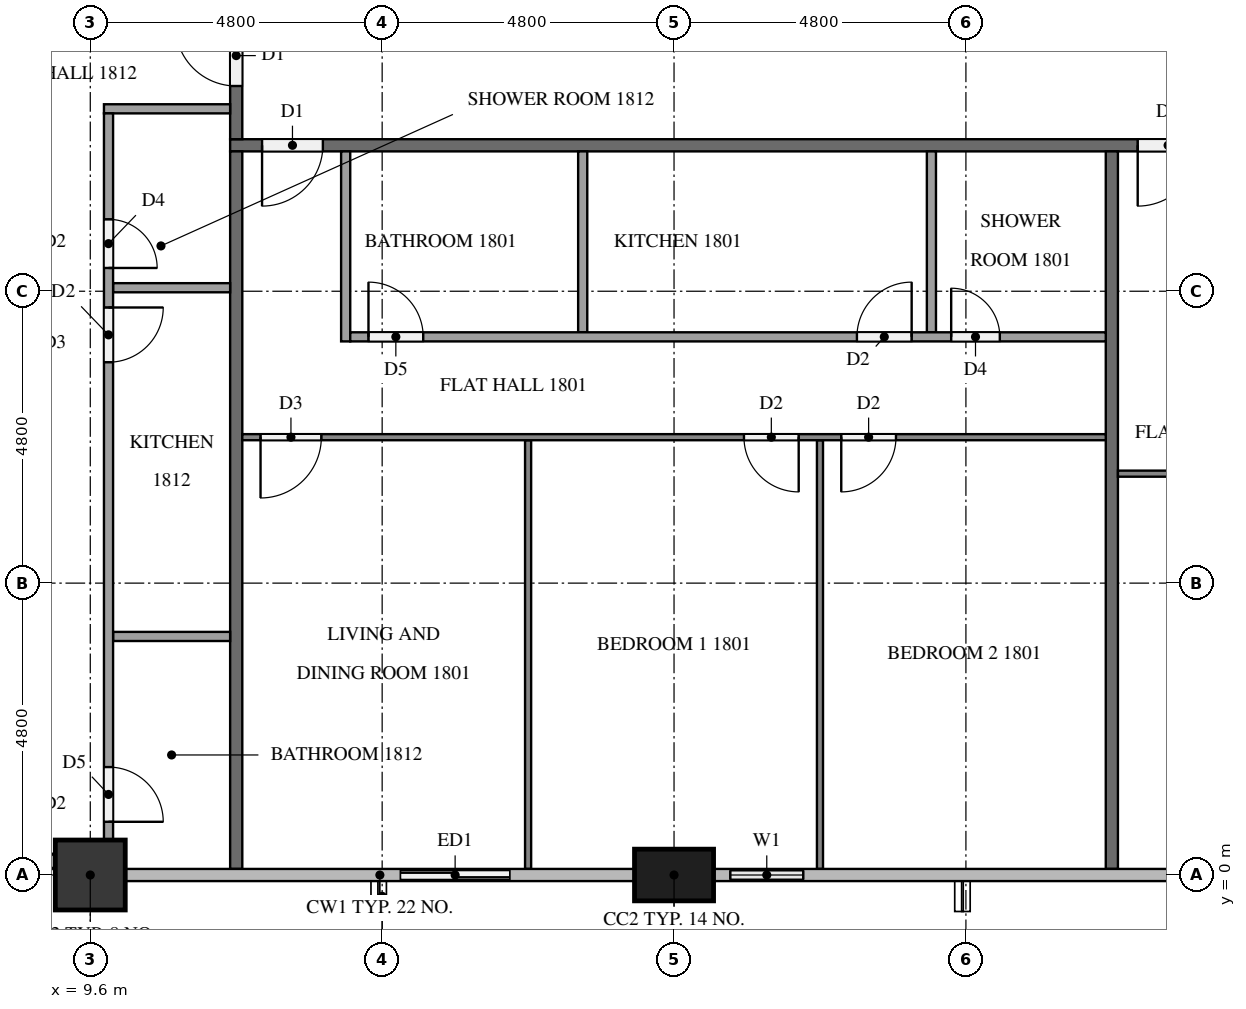
"""IFC4 building model, lengths in metres.
Left out: names, types, materials, properties, quantities, classifications, styles, units other than length and angle.
Written with IfcOpenShell. Run it as: python <this file> out.ifc"""

import sys

from ifc_helpers import new_model, si_unit, direction, frame, frame_2d, origin, origin_2d, place, context, subcontext, project, spatial, rectangle, extrude, element, fill, save


model = new_model("IFC4")
c1 = context("Model", 3, precision=1e-05, world=origin(), true_north=direction((0.0, 1.0)))
c2 = subcontext(c1, "Body", "Model", "MODEL_VIEW")
j1 = project(units=[si_unit("LENGTHUNIT", "METRE"), si_unit("PLANEANGLEUNIT", "RADIAN")], contexts=[c1])
p1 = place(None, origin())
s1 = spatial("IfcSite", under=j1, at=p1, CompositionType="ELEMENT")
p2 = place(p1, origin())
s2 = spatial("IfcBuilding", under=s1, at=p2, CompositionType="ELEMENT")
p3 = place(p2, frame((0.0, 0.0, 73.3)))
s3 = spatial("IfcBuildingStorey", under=s2, at=p3, CompositionType="ELEMENT", Elevation=73.3)
p4 = place(p3, frame((9.6, 0.0, 0.0), z_axis=(0.0, 0.0, 1.0), x_axis=(1.0, 0.0, 0.0)))
e1 = element("IfcColumn", 1, at=p4, inside=s3, PredefinedType="COLUMN", context=c2, shape_type="SweptSolid", body=[
    extrude(rectangle(XDim=1.15, YDim=1.15, at=origin_2d()), origin(), (0.0, 0.0, 1.0), 3.2),
])
p5 = place(p3, frame((19.2, 0.0, 0.0), z_axis=(0.0, 0.0, 1.0), x_axis=(1.0, 0.0, 0.0)))
e2 = element("IfcColumn", 2, at=p5, inside=s3, PredefinedType="COLUMN", context=c2, shape_type="SweptSolid", body=[
    extrude(rectangle(XDim=1.3, YDim=0.85, at=origin_2d()), origin(), (0.0, 0.0, 1.0), 3.2),
])
p6 = place(p3, frame((14.4, 0.0, 0.0), z_axis=(0.0, 0.0, 1.0), x_axis=(1.0, 0.0, 0.0)))
e3 = element("IfcWall", 3, at=p6, inside=s3, PredefinedType="SOLIDWALL", context=c2, shape_type="SweptSolid", body=[
    extrude(rectangle(XDim=2.4, YDim=0.15, at=frame_2d((1.2, 0.0))), origin(), (0.0, 0.0, 1.0), 3.2),
])
p7 = place(p6, frame((0.3, 0.0, 0.0)))
e4 = element("IfcOpeningElement", 4, at=p7, cuts=e3, PredefinedType="OPENING", context=c2, shape_type="SweptSolid", body=[
    extrude(rectangle(XDim=1.8, YDim=2.4, at=frame_2d((0.9, 1.2))), frame((0.0, 0.085, 0.0), z_axis=(0.0, -1.0, 0.0), x_axis=(1.0, 0.0, 0.0)), (0.0, 0.0, 1.0), 0.17),
])
p8 = place(p3, frame((19.85, 0.0, 0.0), z_axis=(0.0, 0.0, 1.0), x_axis=(1.0, 0.0, 0.0)))
e5 = element("IfcWall", 5, at=p8, inside=s3, PredefinedType="SOLIDWALL", context=c2, shape_type="SweptSolid", body=[
    extrude(rectangle(XDim=1.75, YDim=0.15, at=frame_2d((0.875, 0.0))), origin(), (0.0, 0.0, 1.0), 3.2),
])
p9 = place(p8, frame((0.275, 0.0, 0.9)))
e6 = element("IfcOpeningElement", 6, at=p9, cuts=e5, PredefinedType="OPENING", context=c2, shape_type="SweptSolid", body=[
    extrude(rectangle(XDim=1.2, YDim=1.4, at=frame_2d((0.6, 0.7))), frame((0.0, 0.085, 0.0), z_axis=(0.0, -1.0, 0.0), x_axis=(1.0, 0.0, 0.0)), (0.0, 0.0, 1.0), 0.17),
])
p10 = place(p3, frame((50.5, 12.0, 0.0), z_axis=(0.0, 0.0, 1.0), x_axis=(-1.0, 0.0, 0.0)))
e7 = element("IfcWall", 7, at=p10, inside=s3, PredefinedType="PARTITIONING", context=c2, shape_type="SweptSolid", body=[
    extrude(rectangle(XDim=38.6, YDim=0.2, at=frame_2d((19.3, 0.0))), origin(), (0.0, 0.0, 1.0), 3.2),
])
p11 = place(p10, frame((37.075, 0.0, 0.0)))
e8 = element("IfcOpeningElement", 8, at=p11, cuts=e7, PredefinedType="OPENING", context=c2, shape_type="SweptSolid", body=[
    extrude(rectangle(XDim=1.0, YDim=2.1, at=frame_2d((0.5, 1.05))), frame((0.0, 0.11, 0.0), z_axis=(0.0, -1.0, 0.0), x_axis=(1.0, 0.0, 0.0)), (0.0, 0.0, 1.0), 0.22),
])
p12 = place(p10, frame((22.675, 0.0, 0.0)))
e9 = element("IfcOpeningElement", 9, at=p12, cuts=e7, PredefinedType="OPENING", context=c2, shape_type="SweptSolid", body=[
    extrude(rectangle(XDim=1.0, YDim=2.1, at=frame_2d((0.5, 1.05))), frame((0.0, 0.11, 0.0), z_axis=(0.0, -1.0, 0.0), x_axis=(1.0, 0.0, 0.0)), (0.0, 0.0, 1.0), 0.22),
])
p13 = place(p10, frame((0.525, 0.0, 0.0)))
e10 = element("IfcOpeningElement", 10, at=p13, cuts=e7, PredefinedType="OPENING", context=c2, shape_type="SweptSolid", body=[
    extrude(rectangle(XDim=1.0, YDim=2.1, at=frame_2d((0.5, 1.05))), frame((0.0, 0.11, 0.0), z_axis=(0.0, -1.0, 0.0), x_axis=(1.0, 0.0, 0.0)), (0.0, 0.0, 1.0), 0.22),
])
p14 = place(p3, frame((12.0, 12.1, 0.0), z_axis=(0.0, 0.0, 1.0), x_axis=(0.0, 1.0, 0.0)))
e11 = element("IfcWall", 11, at=p14, inside=s3, PredefinedType="PARTITIONING", context=c2, shape_type="SweptSolid", body=[
    extrude(rectangle(XDim=28.6, YDim=0.2, at=frame_2d((14.3, 0.0))), origin(), (0.0, 0.0, 1.0), 3.2),
])
p15 = place(p14, frame((14.725, 0.0, 0.0)))
e12 = element("IfcOpeningElement", 12, at=p15, cuts=e11, PredefinedType="OPENING", context=c2, shape_type="SweptSolid", body=[
    extrude(rectangle(XDim=1.0, YDim=2.1, at=frame_2d((0.5, 1.05))), frame((0.0, 0.11, 0.0), z_axis=(0.0, -1.0, 0.0), x_axis=(1.0, 0.0, 0.0)), (0.0, 0.0, 1.0), 0.22),
])
p16 = place(p14, frame((12.875, 0.0, 0.0)))
e13 = element("IfcOpeningElement", 13, at=p16, cuts=e11, PredefinedType="OPENING", context=c2, shape_type="SweptSolid", body=[
    extrude(rectangle(XDim=1.0, YDim=2.1, at=frame_2d((0.5, 1.05))), frame((0.0, 0.11, 0.0), z_axis=(0.0, -1.0, 0.0), x_axis=(1.0, 0.0, 0.0)), (0.0, 0.0, 1.0), 0.22),
])
p17 = place(p14, frame((0.875, 0.0, 0.0)))
e14 = element("IfcOpeningElement", 14, at=p17, cuts=e11, PredefinedType="OPENING", context=c2, shape_type="SweptSolid", body=[
    extrude(rectangle(XDim=1.0, YDim=2.1, at=frame_2d((0.5, 1.05))), frame((0.0, 0.11, 0.0), z_axis=(0.0, -1.0, 0.0), x_axis=(1.0, 0.0, 0.0)), (0.0, 0.0, 1.0), 0.22),
])
for number, where, z_axis, x_axis in (
    (15, (26.4, 11.9, 0.0), (0.0, 0.0, 1.0), (0.0, -1.0, 0.0)),
    (16, (12.0, 0.1, 0.0), (0.0, 0.0, 1.0), (0.0, 1.0, 0.0)),
):
    element("IfcWall", number, at=place(p3, frame(where, z_axis=z_axis, x_axis=x_axis)), inside=s3, PredefinedType="PARTITIONING", context=c2, shape_type="SweptSolid", body=[
        extrude(rectangle(XDim=11.8, YDim=0.2, at=frame_2d((5.9, 0.0))), origin(), (0.0, 0.0, 1.0), 3.2),
    ])
for number, where, z_axis, x_axis in (
    (17, (16.8, 7.15, 0.0), (0.0, 0.0, 1.0), (0.0, -1.0, 0.0)),
    (18, (21.6, 7.15, 0.0), (0.0, 0.0, 1.0), (0.0, -1.0, 0.0)),
):
    element("IfcWall", number, at=place(p3, frame(where, z_axis=z_axis, x_axis=x_axis)), inside=s3, PredefinedType="PARTITIONING", context=c2, shape_type="SweptSolid", body=[
        extrude(rectangle(XDim=7.05, YDim=0.1, at=frame_2d((3.525, 0.0))), origin(), (0.0, 0.0, 1.0), 3.2),
    ])
p18 = place(p3, frame((26.3, 7.2, 0.0), z_axis=(0.0, 0.0, 1.0), x_axis=(-1.0, 0.0, 0.0)))
e19 = element("IfcWall", 19, at=p18, inside=s3, PredefinedType="PARTITIONING", context=c2, shape_type="SweptSolid", body=[
    extrude(rectangle(XDim=14.2, YDim=0.1, at=frame_2d((7.1, 0.0))), origin(), (0.0, 0.0, 1.0), 3.2),
])
p19 = place(p18, frame((12.9, 0.0, 0.0)))
e20 = element("IfcOpeningElement", 20, at=p19, cuts=e19, PredefinedType="OPENING", context=c2, shape_type="SweptSolid", body=[
    extrude(rectangle(XDim=1.0, YDim=2.1, at=frame_2d((0.5, 1.05))), frame((0.0, 0.06, 0.0), z_axis=(0.0, -1.0, 0.0), x_axis=(1.0, 0.0, 0.0)), (0.0, 0.0, 1.0), 0.12),
])
p20 = place(p18, frame((5.05, 0.0, 0.0)))
e21 = element("IfcOpeningElement", 21, at=p20, cuts=e19, PredefinedType="OPENING", context=c2, shape_type="SweptSolid", body=[
    extrude(rectangle(XDim=0.9, YDim=2.1, at=frame_2d((0.45, 1.05))), frame((0.0, 0.06, 0.0), z_axis=(0.0, -1.0, 0.0), x_axis=(1.0, 0.0, 0.0)), (0.0, 0.0, 1.0), 0.12),
])
p21 = place(p18, frame((3.45, 0.0, 0.0)))
e22 = element("IfcOpeningElement", 22, at=p21, cuts=e19, PredefinedType="OPENING", context=c2, shape_type="SweptSolid", body=[
    extrude(rectangle(XDim=0.9, YDim=2.1, at=frame_2d((0.45, 1.05))), frame((0.0, 0.06, 0.0), z_axis=(0.0, -1.0, 0.0), x_axis=(1.0, 0.0, 0.0)), (0.0, 0.0, 1.0), 0.12),
])
for number, where, z_axis, x_axis in (
    (23, (17.698, 11.9, 0.0), (0.0, 0.0, 1.0), (0.0, -1.0, 0.0)),
    (24, (23.433, 11.9, 0.0), (0.0, 0.0, 1.0), (0.0, -1.0, 0.0)),
):
    element("IfcWall", number, at=place(p3, frame(where, z_axis=z_axis, x_axis=x_axis)), inside=s3, PredefinedType="PARTITIONING", context=c2, shape_type="SweptSolid", body=[
        extrude(rectangle(XDim=2.975, YDim=0.15, at=frame_2d((1.487, 0.0))), origin(), (0.0, 0.0, 1.0), 3.2),
    ])
p22 = place(p3, frame((13.8, 11.9, 0.0), z_axis=(0.0, 0.0, 1.0), x_axis=(0.0, -1.0, 0.0)))
e25 = element("IfcWall", 25, at=p22, inside=s3, PredefinedType="PARTITIONING", context=c2, shape_type="SweptSolid", body=[
    extrude(rectangle(XDim=3.125, YDim=0.15, at=frame_2d((1.562, 0.0))), origin(), (0.0, 0.0, 1.0), 3.2),
])
p23 = place(p3, frame((13.875, 8.85, 0.0), z_axis=(0.0, 0.0, 1.0), x_axis=(1.0, 0.0, 0.0)))
e26 = element("IfcWall", 26, at=p23, inside=s3, PredefinedType="PARTITIONING", context=c2, shape_type="SweptSolid", body=[
    extrude(rectangle(XDim=12.425, YDim=0.15, at=frame_2d((6.212, 0.0))), origin(), (0.0, 0.0, 1.0), 3.2),
])
p24 = place(p23, frame((0.3, 0.0, 0.0)))
e27 = element("IfcOpeningElement", 27, at=p24, cuts=e26, PredefinedType="OPENING", context=c2, shape_type="SweptSolid", body=[
    extrude(rectangle(XDim=0.9, YDim=2.1, at=frame_2d((0.45, 1.05))), frame((0.0, 0.085, 0.0), z_axis=(0.0, -1.0, 0.0), x_axis=(1.0, 0.0, 0.0)), (0.0, 0.0, 1.0), 0.17),
])
p25 = place(p23, frame((8.333, 0.0, 0.0)))
e28 = element("IfcOpeningElement", 28, at=p25, cuts=e26, PredefinedType="OPENING", context=c2, shape_type="SweptSolid", body=[
    extrude(rectangle(XDim=0.9, YDim=2.1, at=frame_2d((0.45, 1.05))), frame((0.0, 0.085, 0.0), z_axis=(0.0, -1.0, 0.0), x_axis=(1.0, 0.0, 0.0)), (0.0, 0.0, 1.0), 0.17),
])
p26 = place(p23, frame((9.883, 0.0, 0.0)))
e29 = element("IfcOpeningElement", 29, at=p26, cuts=e26, PredefinedType="OPENING", context=c2, shape_type="SweptSolid", body=[
    extrude(rectangle(XDim=0.8, YDim=2.1, at=frame_2d((0.4, 1.05))), frame((0.0, 0.085, 0.0), z_axis=(0.0, -1.0, 0.0), x_axis=(1.0, 0.0, 0.0)), (0.0, 0.0, 1.0), 0.17),
])
p27 = place(p3, frame((38.3, 6.6, 0.0), z_axis=(0.0, 0.0, 1.0), x_axis=(-1.0, 0.0, 0.0)))
e30 = element("IfcWall", 30, at=p27, inside=s3, PredefinedType="PARTITIONING", context=c2, shape_type="SweptSolid", body=[
    extrude(rectangle(XDim=11.8, YDim=0.1, at=frame_2d((5.9, 0.0))), origin(), (0.0, 0.0, 1.0), 3.2),
])
p28 = place(p27, frame((5.05, 0.0, 0.0)))
e31 = element("IfcOpeningElement", 31, at=p28, cuts=e30, PredefinedType="OPENING", context=c2, shape_type="SweptSolid", body=[
    extrude(rectangle(XDim=1.0, YDim=2.1, at=frame_2d((0.5, 1.05))), frame((0.0, 0.06, 0.0), z_axis=(0.0, -1.0, 0.0), x_axis=(1.0, 0.0, 0.0)), (0.0, 0.0, 1.0), 0.12),
])
p29 = place(p27, frame((3.45, 0.0, 0.0)))
e32 = element("IfcOpeningElement", 32, at=p29, cuts=e30, PredefinedType="OPENING", context=c2, shape_type="SweptSolid", body=[
    extrude(rectangle(XDim=0.9, YDim=2.1, at=frame_2d((0.45, 1.05))), frame((0.0, 0.06, 0.0), z_axis=(0.0, -1.0, 0.0), x_axis=(1.0, 0.0, 0.0)), (0.0, 0.0, 1.0), 0.12),
])
for number, where, z_axis, x_axis in (
    (33, (11.9, 9.658, 0.0), (0.0, 0.0, 1.0), (-1.0, 0.0, 0.0)),
    (34, (11.9, 3.923, 0.0), (0.0, 0.0, 1.0), (-1.0, 0.0, 0.0)),
):
    element("IfcWall", number, at=place(p3, frame(where, z_axis=z_axis, x_axis=x_axis)), inside=s3, PredefinedType="PARTITIONING", context=c2, shape_type="SweptSolid", body=[
        extrude(rectangle(XDim=1.925, YDim=0.15, at=frame_2d((0.962, 0.0))), origin(), (0.0, 0.0, 1.0), 3.2),
    ])
p30 = place(p3, frame((11.9, 12.6, 0.0), z_axis=(0.0, 0.0, 1.0), x_axis=(-1.0, 0.0, 0.0)))
e35 = element("IfcWall", 35, at=p30, inside=s3, PredefinedType="PARTITIONING", context=c2, shape_type="SweptSolid", body=[
    extrude(rectangle(XDim=2.075, YDim=0.15, at=frame_2d((1.038, 0.0))), origin(), (0.0, 0.0, 1.0), 3.2),
])
p31 = place(p3, frame((9.9, 12.525, 0.0), z_axis=(0.0, 0.0, 1.0), x_axis=(0.0, -1.0, 0.0)))
e36 = element("IfcWall", 36, at=p31, inside=s3, PredefinedType="PARTITIONING", context=c2, shape_type="SweptSolid", body=[
    extrude(rectangle(XDim=11.95, YDim=0.15, at=frame_2d((5.975, 0.0))), origin(), (0.0, 0.0, 1.0), 3.2),
])
p32 = place(p31, frame((1.742, 0.0, 0.0)))
e37 = element("IfcOpeningElement", 37, at=p32, cuts=e36, PredefinedType="OPENING", context=c2, shape_type="SweptSolid", body=[
    extrude(rectangle(XDim=0.8, YDim=2.1, at=frame_2d((0.4, 1.05))), frame((0.0, 0.085, 0.0), z_axis=(0.0, -1.0, 0.0), x_axis=(1.0, 0.0, 0.0)), (0.0, 0.0, 1.0), 0.17),
])
p33 = place(p31, frame((3.192, 0.0, 0.0)))
e38 = element("IfcOpeningElement", 38, at=p33, cuts=e36, PredefinedType="OPENING", context=c2, shape_type="SweptSolid", body=[
    extrude(rectangle(XDim=0.9, YDim=2.1, at=frame_2d((0.45, 1.05))), frame((0.0, 0.085, 0.0), z_axis=(0.0, -1.0, 0.0), x_axis=(1.0, 0.0, 0.0)), (0.0, 0.0, 1.0), 0.17),
])
p34 = place(p31, frame((10.75, 0.0, 0.0)))
e39 = element("IfcOpeningElement", 39, at=p34, cuts=e36, PredefinedType="OPENING", context=c2, shape_type="SweptSolid", body=[
    extrude(rectangle(XDim=0.9, YDim=2.1, at=frame_2d((0.45, 1.05))), frame((0.0, 0.085, 0.0), z_axis=(0.0, -1.0, 0.0), x_axis=(1.0, 0.0, 0.0)), (0.0, 0.0, 1.0), 0.17),
])
p35 = place(p7, origin())
e40 = element("IfcDoor", 40, at=p35, inside=s3, OperationType="SLIDING_TO_LEFT", PredefinedType="DOOR", context=c2, shape_type="SweptSolid", body=[
    extrude(rectangle(XDim=1.8, YDim=2.4, at=frame_2d((0.9, 1.2))), frame((0.0, 0.025, 0.0), z_axis=(0.0, -1.0, 0.0), x_axis=(1.0, 0.0, 0.0)), (0.0, 0.0, 1.0), 0.05),
])
fill(e4, e40)
p36 = place(p9, origin())
e41 = element("IfcWindow", 41, at=p36, inside=s3, PartitioningType="SINGLE_PANEL", PredefinedType="WINDOW", context=c2, shape_type="SweptSolid", body=[
    extrude(rectangle(XDim=1.2, YDim=1.4, at=frame_2d((0.6, 0.7))), frame((0.0, 0.03, 0.0), z_axis=(0.0, -1.0, 0.0), x_axis=(1.0, 0.0, 0.0)), (0.0, 0.0, 1.0), 0.06),
])
fill(e6, e41)
p37 = place(p11, origin())
e42 = element("IfcDoor", 42, at=p37, inside=s3, OperationType="SINGLE_SWING_RIGHT", PredefinedType="DOOR", context=c2, shape_type="SweptSolid", body=[
    extrude(rectangle(XDim=1.0, YDim=2.1, at=frame_2d((0.5, 1.05))), frame((0.0, 0.025, 0.0), z_axis=(0.0, -1.0, 0.0), x_axis=(1.0, 0.0, 0.0)), (0.0, 0.0, 1.0), 0.05),
])
fill(e8, e42)
p38 = place(p12, origin())
e43 = element("IfcDoor", 43, at=p38, inside=s3, OperationType="SINGLE_SWING_RIGHT", PredefinedType="DOOR", context=c2, shape_type="SweptSolid", body=[
    extrude(rectangle(XDim=1.0, YDim=2.1, at=frame_2d((0.5, 1.05))), frame((0.0, 0.025, 0.0), z_axis=(0.0, -1.0, 0.0), x_axis=(1.0, 0.0, 0.0)), (0.0, 0.0, 1.0), 0.05),
])
fill(e9, e43)
p39 = place(p17, origin())
e44 = element("IfcDoor", 44, at=p39, inside=s3, OperationType="SINGLE_SWING_RIGHT", PredefinedType="DOOR", context=c2, shape_type="SweptSolid", body=[
    extrude(rectangle(XDim=1.0, YDim=2.1, at=frame_2d((0.5, 1.05))), frame((0.0, 0.025, 0.0), z_axis=(0.0, -1.0, 0.0), x_axis=(1.0, 0.0, 0.0)), (0.0, 0.0, 1.0), 0.05),
])
fill(e14, e44)
p40 = place(p19, origin())
e45 = element("IfcDoor", 45, at=p40, inside=s3, OperationType="SINGLE_SWING_RIGHT", PredefinedType="DOOR", context=c2, shape_type="SweptSolid", body=[
    extrude(rectangle(XDim=1.0, YDim=2.1, at=frame_2d((0.5, 1.05))), frame((0.0, 0.025, 0.0), z_axis=(0.0, -1.0, 0.0), x_axis=(1.0, 0.0, 0.0)), (0.0, 0.0, 1.0), 0.05),
])
fill(e20, e45)
p41 = place(p20, origin())
e46 = element("IfcDoor", 46, at=p41, inside=s3, OperationType="SINGLE_SWING_LEFT", PredefinedType="DOOR", context=c2, shape_type="SweptSolid", body=[
    extrude(rectangle(XDim=0.9, YDim=2.1, at=frame_2d((0.45, 1.05))), frame((0.0, 0.025, 0.0), z_axis=(0.0, -1.0, 0.0), x_axis=(1.0, 0.0, 0.0)), (0.0, 0.0, 1.0), 0.05),
])
fill(e21, e46)
p42 = place(p21, origin())
e47 = element("IfcDoor", 47, at=p42, inside=s3, OperationType="SINGLE_SWING_RIGHT", PredefinedType="DOOR", context=c2, shape_type="SweptSolid", body=[
    extrude(rectangle(XDim=0.9, YDim=2.1, at=frame_2d((0.45, 1.05))), frame((0.0, 0.025, 0.0), z_axis=(0.0, -1.0, 0.0), x_axis=(1.0, 0.0, 0.0)), (0.0, 0.0, 1.0), 0.05),
])
fill(e22, e47)
p43 = place(p24, origin())
e48 = element("IfcDoor", 48, at=p43, inside=s3, OperationType="SINGLE_SWING_LEFT", PredefinedType="DOOR", context=c2, shape_type="SweptSolid", body=[
    extrude(rectangle(XDim=0.9, YDim=2.1, at=frame_2d((0.45, 1.05))), frame((0.0, 0.025, 0.0), z_axis=(0.0, -1.0, 0.0), x_axis=(1.0, 0.0, 0.0)), (0.0, 0.0, 1.0), 0.05),
])
fill(e27, e48)
p44 = place(p25, origin())
e49 = element("IfcDoor", 49, at=p44, inside=s3, OperationType="SINGLE_SWING_RIGHT", PredefinedType="DOOR", context=c2, shape_type="SweptSolid", body=[
    extrude(rectangle(XDim=0.9, YDim=2.1, at=frame_2d((0.45, 1.05))), frame((0.0, 0.025, 0.0), z_axis=(0.0, -1.0, 0.0), x_axis=(1.0, 0.0, 0.0)), (0.0, 0.0, 1.0), 0.05),
])
fill(e28, e49)
p45 = place(p26, origin())
e50 = element("IfcDoor", 50, at=p45, inside=s3, OperationType="SINGLE_SWING_LEFT", PredefinedType="DOOR", context=c2, shape_type="SweptSolid", body=[
    extrude(rectangle(XDim=0.8, YDim=2.1, at=frame_2d((0.4, 1.05))), frame((0.0, 0.025, 0.0), z_axis=(0.0, -1.0, 0.0), x_axis=(1.0, 0.0, 0.0)), (0.0, 0.0, 1.0), 0.05),
])
fill(e29, e50)
p46 = place(p32, origin())
e51 = element("IfcDoor", 51, at=p46, inside=s3, OperationType="SINGLE_SWING_RIGHT", PredefinedType="DOOR", context=c2, shape_type="SweptSolid", body=[
    extrude(rectangle(XDim=0.8, YDim=2.1, at=frame_2d((0.4, 1.05))), frame((0.0, 0.025, 0.0), z_axis=(0.0, -1.0, 0.0), x_axis=(1.0, 0.0, 0.0)), (0.0, 0.0, 1.0), 0.05),
])
fill(e37, e51)
p47 = place(p33, origin())
e52 = element("IfcDoor", 52, at=p47, inside=s3, OperationType="SINGLE_SWING_LEFT", PredefinedType="DOOR", context=c2, shape_type="SweptSolid", body=[
    extrude(rectangle(XDim=0.9, YDim=2.1, at=frame_2d((0.45, 1.05))), frame((0.0, 0.025, 0.0), z_axis=(0.0, -1.0, 0.0), x_axis=(1.0, 0.0, 0.0)), (0.0, 0.0, 1.0), 0.05),
])
fill(e38, e52)
p48 = place(p34, origin())
e53 = element("IfcDoor", 53, at=p48, inside=s3, OperationType="SINGLE_SWING_RIGHT", PredefinedType="DOOR", context=c2, shape_type="SweptSolid", body=[
    extrude(rectangle(XDim=0.9, YDim=2.1, at=frame_2d((0.45, 1.05))), frame((0.0, 0.025, 0.0), z_axis=(0.0, -1.0, 0.0), x_axis=(1.0, 0.0, 0.0)), (0.0, 0.0, 1.0), 0.05),
])
fill(e39, e53)
save(model, sys.argv[1])
